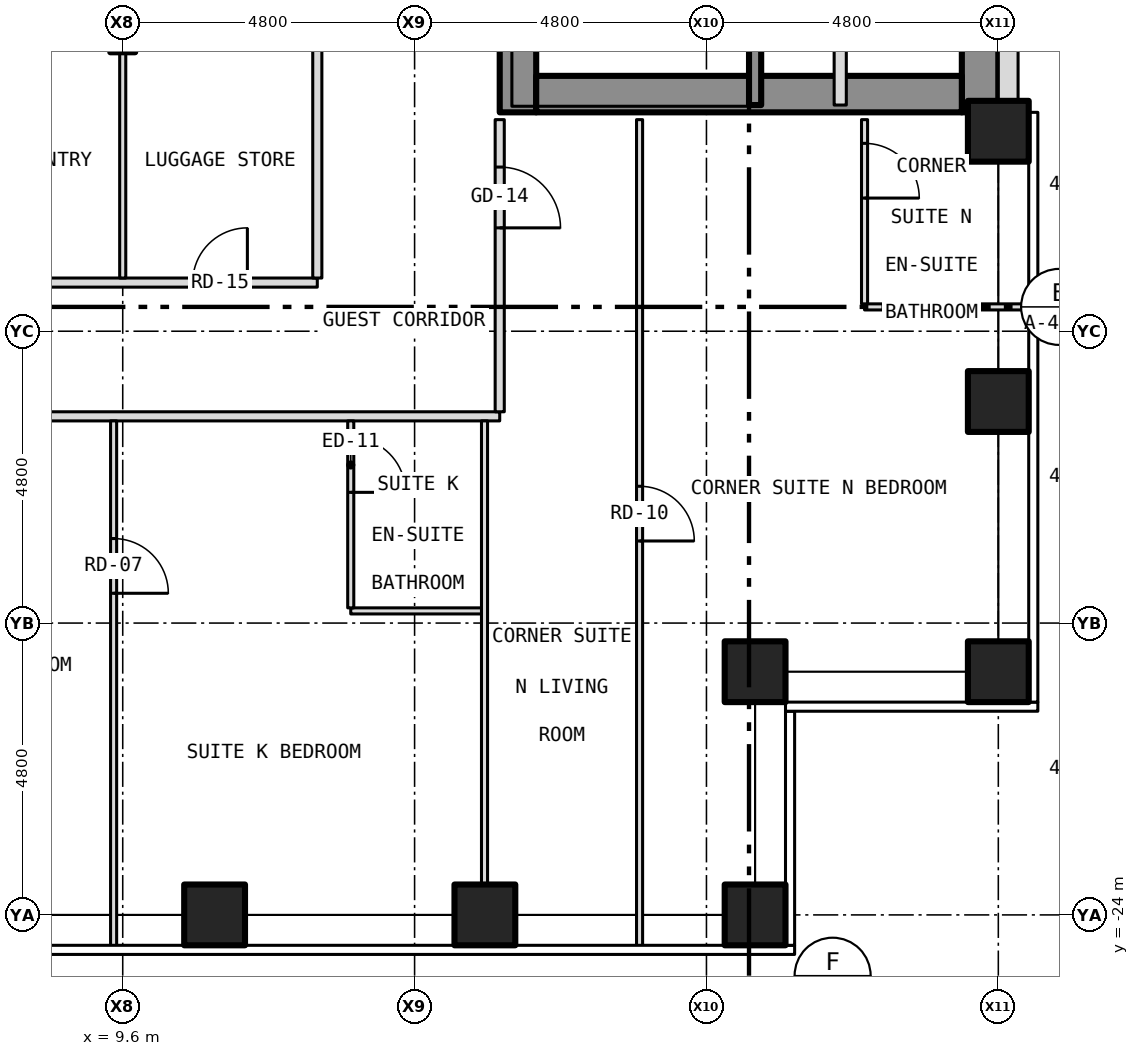
"""IFC4 building model, lengths in metres.
Left out: names, types, materials, properties, quantities, classifications, styles, units other than length and angle.
Written with IfcOpenShell. Run it as: python <this file> out.ifc"""

import sys

from ifc_helpers import new_model, si_unit, direction, frame, frame_2d, origin, origin_2d, place, context, subcontext, project, spatial, rectangle, hollow_rectangle, i_section, extrude, element, fill, save


model = new_model("IFC4")
c1 = context("Model", 3, precision=1e-05, world=origin(), true_north=direction((0.0, 1.0)))
c2 = subcontext(c1, "Body", "Model", "MODEL_VIEW")
j1 = project(units=[si_unit("LENGTHUNIT", "METRE"), si_unit("PLANEANGLEUNIT", "RADIAN")], contexts=[c1])
p1 = place(None, origin())
s1 = spatial("IfcSite", under=j1, at=p1, CompositionType="ELEMENT")
p2 = place(p1, origin())
s2 = spatial("IfcBuilding", under=s1, at=p2, CompositionType="ELEMENT")
p3 = place(p2, frame((0.0, 0.0, 53.0)))
s3 = spatial("IfcBuildingStorey", under=s2, at=p3, CompositionType="ELEMENT", Elevation=53.0)
for number, where, z_axis, x_axis in (
    (1, (11.111, -24.0, -0.15), (0.0, 0.0, 1.0), (1.0, 0.0, 0.0)),
    (2, (15.556, -24.0, -0.15), (0.0, 0.0, 1.0), (1.0, 0.0, 0.0)),
    (3, (20.0, -24.0, -0.15), (0.0, 0.0, 1.0), (1.0, 0.0, 0.0)),
    (4, (24.0, -20.0, -0.15), (0.0, 0.0, 1.0), (1.0, 0.0, 0.0)),
    (5, (24.0, -15.556, -0.15), (0.0, 0.0, 1.0), (1.0, 0.0, 0.0)),
    (6, (24.0, -11.111, -0.15), (0.0, 0.0, 1.0), (1.0, 0.0, 0.0)),
    (7, (20.0, -20.0, -0.15), (0.0, 0.0, 1.0), (1.0, 0.0, 0.0)),
):
    element("IfcColumn", number, at=place(p3, frame(where, z_axis=z_axis, x_axis=x_axis)), inside=s3, PredefinedType="COLUMN", context=c2, shape_type="SweptSolid", body=[
        extrude(hollow_rectangle(XDim=1.0, YDim=1.0, WallThickness=0.06, at=origin_2d()), origin(), (0.0, 0.0, 1.0), 3.5),
    ])
p4 = place(p3, frame((9.6, -9.6, -0.15), z_axis=(0.0, 0.0, 1.0), x_axis=(1.0, 0.0, 0.0)))
e8 = element("IfcColumn", 8, at=p4, inside=s3, PredefinedType="COLUMN", context=c2, shape_type="SweptSolid", body=[
    extrude(i_section(OverallWidth=0.409, OverallDepth=0.424, WebThickness=0.033, FlangeThickness=0.052, at=origin_2d()), origin(), (0.0, 0.0, 1.0), 3.5),
])
p5 = place(p3, frame((16.1, -10.8, 0.0), z_axis=(0.0, 0.0, 1.0), x_axis=(0.0, 1.0, 0.0)))
e9 = element("IfcWall", 9, at=p5, inside=s3, PredefinedType="SHEAR", context=c2, shape_type="SweptSolid", body=[
    extrude(rectangle(XDim=21.6, YDim=0.6, at=frame_2d((10.8, 0.0))), origin(), (0.0, 0.0, 1.0), 3.25),
])
p6 = place(p5, frame((9.4, 0.0, 0.0)))
e10 = element("IfcOpeningElement", 10, at=p6, cuts=e9, PredefinedType="OPENING", context=c2, shape_type="SweptSolid", body=[
    extrude(rectangle(XDim=1.1, YDim=2.1, at=frame_2d((0.55, 1.05))), frame((0.0, 0.312, 0.0), z_axis=(0.0, -1.0, 0.0), x_axis=(1.0, 0.0, 0.0)), (0.0, 0.0, 1.0), 0.624),
])
p7 = place(p5, frame((11.5, 0.0, 0.0)))
e11 = element("IfcOpeningElement", 11, at=p7, cuts=e9, PredefinedType="OPENING", context=c2, shape_type="SweptSolid", body=[
    extrude(rectangle(XDim=1.1, YDim=2.1, at=frame_2d((0.55, 1.05))), frame((0.0, 0.312, 0.0), z_axis=(0.0, -1.0, 0.0), x_axis=(1.0, 0.0, 0.0)), (0.0, 0.0, 1.0), 0.624),
])
p8 = place(p5, frame((13.6, 0.0, 0.0)))
e12 = element("IfcOpeningElement", 12, at=p8, cuts=e9, PredefinedType="OPENING", context=c2, shape_type="SweptSolid", body=[
    extrude(rectangle(XDim=1.1, YDim=2.1, at=frame_2d((0.55, 1.05))), frame((0.0, 0.312, 0.0), z_axis=(0.0, -1.0, 0.0), x_axis=(1.0, 0.0, 0.0)), (0.0, 0.0, 1.0), 0.624),
])
p9 = place(p5, frame((15.7, 0.0, 0.0)))
e13 = element("IfcOpeningElement", 13, at=p9, cuts=e9, PredefinedType="OPENING", context=c2, shape_type="SweptSolid", body=[
    extrude(rectangle(XDim=1.1, YDim=2.1, at=frame_2d((0.55, 1.05))), frame((0.0, 0.312, 0.0), z_axis=(0.0, -1.0, 0.0), x_axis=(1.0, 0.0, 0.0)), (0.0, 0.0, 1.0), 0.624),
])
p10 = place(p5, frame((17.8, 0.0, 0.0)))
e14 = element("IfcOpeningElement", 14, at=p10, cuts=e9, PredefinedType="OPENING", context=c2, shape_type="SweptSolid", body=[
    extrude(rectangle(XDim=1.1, YDim=2.1, at=frame_2d((0.55, 1.05))), frame((0.0, 0.312, 0.0), z_axis=(0.0, -1.0, 0.0), x_axis=(1.0, 0.0, 0.0)), (0.0, 0.0, 1.0), 0.624),
])
p11 = place(p5, frame((5.642, 0.0, 0.0)))
e15 = element("IfcOpeningElement", 15, at=p11, cuts=e9, PredefinedType="OPENING", context=c2, shape_type="SweptSolid", body=[
    extrude(rectangle(XDim=1.1, YDim=2.1, at=frame_2d((0.55, 1.05))), frame((0.0, 0.312, 0.0), z_axis=(0.0, -1.0, 0.0), x_axis=(1.0, 0.0, 0.0)), (0.0, 0.0, 1.0), 0.624),
])
p12 = place(p5, frame((7.5, 0.0, 0.0)))
e16 = element("IfcOpeningElement", 16, at=p12, cuts=e9, PredefinedType="OPENING", context=c2, shape_type="SweptSolid", body=[
    extrude(rectangle(XDim=1.1, YDim=2.1, at=frame_2d((0.55, 1.05))), frame((0.0, 0.312, 0.0), z_axis=(0.0, -1.0, 0.0), x_axis=(1.0, 0.0, 0.0)), (0.0, 0.0, 1.0), 0.624),
])
p13 = place(p3, frame((23.7, -10.8, 0.0), z_axis=(0.0, 0.0, 1.0), x_axis=(0.0, 1.0, 0.0)))
e17 = element("IfcWall", 17, at=p13, inside=s3, PredefinedType="SHEAR", context=c2, shape_type="SweptSolid", body=[
    extrude(rectangle(XDim=21.6, YDim=0.6, at=frame_2d((10.8, 0.0))), origin(), (0.0, 0.0, 1.0), 3.25),
])
p14 = place(p3, frame((16.4, -10.5, 0.0), z_axis=(0.0, 0.0, 1.0), x_axis=(1.0, 0.0, 0.0)))
e18 = element("IfcWall", 18, at=p14, inside=s3, PredefinedType="SHEAR", context=c2, shape_type="SweptSolid", body=[
    extrude(rectangle(XDim=7.0, YDim=0.6, at=frame_2d((3.5, 0.0))), origin(), (0.0, 0.0, 1.0), 3.25),
])
p15 = place(p3, frame((24.163, -10.8, 0.0), z_axis=(0.0, 0.0, 1.0), x_axis=(0.0, 1.0, 0.0)))
e19 = element("IfcWall", 19, at=p15, inside=s3, PredefinedType="SOLIDWALL", context=c2, shape_type="SweptSolid", body=[
    extrude(rectangle(XDim=21.6, YDim=0.325, at=frame_2d((10.8, 0.0))), origin(), (0.0, 0.0, 1.0), 3.5),
])
p16 = place(p15, frame((2.95, 0.0, 1.0)))
e20 = element("IfcOpeningElement", 20, at=p16, cuts=e19, PredefinedType="OPENING", context=c2, shape_type="SweptSolid", body=[
    extrude(rectangle(XDim=0.6, YDim=1.5, at=frame_2d((0.3, 0.75))), frame((0.0, 0.175, 0.0), z_axis=(0.0, -1.0, 0.0), x_axis=(1.0, 0.0, 0.0)), (0.0, 0.0, 1.0), 0.349),
])
p17 = place(p3, frame((13.35, -19.0, 0.0), z_axis=(0.0, 0.0, 1.0), x_axis=(1.0, 0.0, 0.0)))
e21 = element("IfcWall", 21, at=p17, inside=s3, PredefinedType="PARTITIONING", context=c2, shape_type="SweptSolid", body=[
    extrude(rectangle(XDim=2.2, YDim=0.1, at=frame_2d((1.1, 0.0))), origin(), (0.0, 0.0, 1.0), 3.35),
])
p18 = place(p3, frame((-15.8, -15.8, 0.0), z_axis=(0.0, 0.0, 1.0), x_axis=(1.0, 0.0, 0.0)))
e22 = element("IfcWall", 22, at=p18, inside=s3, PredefinedType="PARTITIONING", context=c2, shape_type="SweptSolid", body=[
    extrude(rectangle(XDim=31.6, YDim=0.15, at=frame_2d((15.8, 0.0))), origin(), (0.0, 0.0, 1.0), 3.35),
])
p19 = place(p18, frame((3.067, 0.0, 0.0)))
e23 = element("IfcOpeningElement", 23, at=p19, cuts=e22, PredefinedType="OPENING", context=c2, shape_type="SweptSolid", body=[
    extrude(rectangle(XDim=1.0, YDim=2.1, at=frame_2d((0.5, 1.05))), frame((0.0, 0.087, 0.0), z_axis=(0.0, -1.0, 0.0), x_axis=(1.0, 0.0, 0.0)), (0.0, 0.0, 1.0), 0.174),
])
p20 = place(p18, frame((5.311, 0.0, 0.0)))
e24 = element("IfcOpeningElement", 24, at=p20, cuts=e22, PredefinedType="OPENING", context=c2, shape_type="SweptSolid", body=[
    extrude(rectangle(XDim=1.0, YDim=2.1, at=frame_2d((0.5, 1.05))), frame((0.0, 0.087, 0.0), z_axis=(0.0, -1.0, 0.0), x_axis=(1.0, 0.0, 0.0)), (0.0, 0.0, 1.0), 0.174),
])
p21 = place(p18, frame((9.756, 0.0, 0.0)))
e25 = element("IfcOpeningElement", 25, at=p21, cuts=e22, PredefinedType="OPENING", context=c2, shape_type="SweptSolid", body=[
    extrude(rectangle(XDim=1.0, YDim=2.1, at=frame_2d((0.5, 1.05))), frame((0.0, 0.087, 0.0), z_axis=(0.0, -1.0, 0.0), x_axis=(1.0, 0.0, 0.0)), (0.0, 0.0, 1.0), 0.174),
])
p22 = place(p18, frame((15.311, 0.0, 0.0)))
e26 = element("IfcOpeningElement", 26, at=p22, cuts=e22, PredefinedType="OPENING", context=c2, shape_type="SweptSolid", body=[
    extrude(rectangle(XDim=1.0, YDim=2.1, at=frame_2d((0.5, 1.05))), frame((0.0, 0.087, 0.0), z_axis=(0.0, -1.0, 0.0), x_axis=(1.0, 0.0, 0.0)), (0.0, 0.0, 1.0), 0.174),
])
p23 = place(p18, frame((22.245, 0.0, 0.0)))
e27 = element("IfcOpeningElement", 27, at=p23, cuts=e22, PredefinedType="OPENING", context=c2, shape_type="SweptSolid", body=[
    extrude(rectangle(XDim=1.0, YDim=2.1, at=frame_2d((0.5, 1.05))), frame((0.0, 0.087, 0.0), z_axis=(0.0, -1.0, 0.0), x_axis=(1.0, 0.0, 0.0)), (0.0, 0.0, 1.0), 0.174),
])
p24 = place(p3, frame((21.8, -14.0, 0.0), z_axis=(0.0, 0.0, 1.0), x_axis=(1.0, 0.0, 0.0)))
e28 = element("IfcWall", 28, at=p24, inside=s3, PredefinedType="PARTITIONING", context=c2, shape_type="SweptSolid", body=[
    extrude(rectangle(XDim=2.73, YDim=0.1, at=frame_2d((1.365, 0.0))), origin(), (0.0, 0.0, 1.0), 3.35),
])
p25 = place(p3, frame((6.3, -13.6, 0.0), z_axis=(0.0, 0.0, 1.0), x_axis=(1.0, 0.0, 0.0)))
e29 = element("IfcWall", 29, at=p25, inside=s3, PredefinedType="PARTITIONING", context=c2, shape_type="SweptSolid", body=[
    extrude(rectangle(XDim=6.5, YDim=0.15, at=frame_2d((3.25, 0.0))), origin(), (0.0, 0.0, 1.0), 3.35),
])
p26 = place(p25, frame((4.45, 0.0, 0.0)))
e30 = element("IfcOpeningElement", 30, at=p26, cuts=e29, PredefinedType="OPENING", context=c2, shape_type="SweptSolid", body=[
    extrude(rectangle(XDim=0.9, YDim=2.1, at=frame_2d((0.45, 1.05))), frame((0.0, 0.087, 0.0), z_axis=(0.0, -1.0, 0.0), x_axis=(1.0, 0.0, 0.0)), (0.0, 0.0, 1.0), 0.174),
])
p27 = place(p3, frame((9.45, -24.53, 0.0), z_axis=(0.0, 0.0, 1.0), x_axis=(0.0, 1.0, 0.0)))
e31 = element("IfcWall", 31, at=p27, inside=s3, PredefinedType="PARTITIONING", context=c2, shape_type="SweptSolid", body=[
    extrude(rectangle(XDim=8.655, YDim=0.1, at=frame_2d((4.328, 0.0))), origin(), (0.0, 0.0, 1.0), 2.728),
])
p28 = place(p27, frame((5.82, 0.0, 0.0)))
e32 = element("IfcOpeningElement", 32, at=p28, cuts=e31, PredefinedType="OPENING", context=c2, shape_type="SweptSolid", body=[
    extrude(rectangle(XDim=0.9, YDim=2.1, at=frame_2d((0.45, 1.05))), frame((0.0, 0.062, 0.0), z_axis=(0.0, -1.0, 0.0), x_axis=(1.0, 0.0, 0.0)), (0.0, 0.0, 1.0), 0.124),
])
p29 = place(p3, frame((9.6, -13.525, 0.0), z_axis=(0.0, 0.0, 1.0), x_axis=(0.0, 1.0, 0.0)))
e33 = element("IfcWall", 33, at=p29, inside=s3, PredefinedType="PARTITIONING", context=c2, shape_type="SweptSolid", body=[
    extrude(rectangle(XDim=3.875, YDim=0.1, at=frame_2d((1.938, 0.0))), origin(), (0.0, 0.0, 1.0), 2.728),
])
p30 = place(p3, frame((12.8, -13.525, 0.0), z_axis=(0.0, 0.0, 1.0), x_axis=(0.0, 1.0, 0.0)))
e34 = element("IfcWall", 34, at=p30, inside=s3, PredefinedType="PARTITIONING", context=c2, shape_type="SweptSolid", body=[
    extrude(rectangle(XDim=11.525, YDim=0.15, at=frame_2d((5.762, 0.0))), origin(), (0.0, 0.0, 1.0), 3.35),
])
p31 = place(p30, frame((7.325, 0.0, 0.0)))
e35 = element("IfcOpeningElement", 35, at=p31, cuts=e34, PredefinedType="OPENING", context=c2, shape_type="SweptSolid", body=[
    extrude(rectangle(XDim=0.9, YDim=2.1, at=frame_2d((0.45, 1.05))), frame((0.0, 0.087, 0.0), z_axis=(0.0, -1.0, 0.0), x_axis=(1.0, 0.0, 0.0)), (0.0, 0.0, 1.0), 0.174),
])
p32 = place(p3, frame((13.35, -18.95, 0.0), z_axis=(0.0, 0.0, 1.0), x_axis=(0.0, 1.0, 0.0)))
e36 = element("IfcWall", 36, at=p32, inside=s3, PredefinedType="PARTITIONING", context=c2, shape_type="SweptSolid", body=[
    extrude(rectangle(XDim=3.075, YDim=0.1, at=frame_2d((1.538, 0.0))), origin(), (0.0, 0.0, 1.0), 3.35),
])
p33 = place(p32, frame((1.9, 0.0, 0.0)))
e37 = element("IfcOpeningElement", 37, at=p33, cuts=e36, PredefinedType="OPENING", context=c2, shape_type="SweptSolid", body=[
    extrude(rectangle(XDim=0.9, YDim=2.1, at=frame_2d((0.45, 1.05))), frame((0.0, 0.062, 0.0), z_axis=(0.0, -1.0, 0.0), x_axis=(1.0, 0.0, 0.0)), (0.0, 0.0, 1.0), 0.124),
])
p34 = place(p3, frame((15.55, -23.88, 0.0), z_axis=(0.0, 0.0, 1.0), x_axis=(0.0, 1.0, 0.0)))
e38 = element("IfcWall", 38, at=p34, inside=s3, PredefinedType="PARTITIONING", context=c2, shape_type="SweptSolid", body=[
    extrude(rectangle(XDim=8.005, YDim=0.1, at=frame_2d((4.002, 0.0))), origin(), (0.0, 0.0, 1.0), 3.35),
])
p35 = place(p3, frame((15.8, -15.725, 0.0), z_axis=(0.0, 0.0, 1.0), x_axis=(0.0, 1.0, 0.0)))
e39 = element("IfcWall", 39, at=p35, inside=s3, PredefinedType="PARTITIONING", context=c2, shape_type="SweptSolid", body=[
    extrude(rectangle(XDim=4.805, YDim=0.15, at=frame_2d((2.403, 0.0))), origin(), (0.0, 0.0, 1.0), 3.35),
])
p36 = place(p35, frame((3.025, 0.0, 0.0)))
e40 = element("IfcOpeningElement", 40, at=p36, cuts=e39, PredefinedType="OPENING", context=c2, shape_type="SweptSolid", body=[
    extrude(rectangle(XDim=1.0, YDim=2.1, at=frame_2d((0.5, 1.05))), frame((0.0, 0.087, 0.0), z_axis=(0.0, -1.0, 0.0), x_axis=(1.0, 0.0, 0.0)), (0.0, 0.0, 1.0), 0.174),
])
p37 = place(p3, frame((18.1, -24.53, 0.0), z_axis=(0.0, 0.0, 1.0), x_axis=(0.0, 1.0, 0.0)))
e41 = element("IfcWall", 41, at=p37, inside=s3, PredefinedType="PARTITIONING", context=c2, shape_type="SweptSolid", body=[
    extrude(rectangle(XDim=13.61, YDim=0.1, at=frame_2d((6.805, 0.0))), origin(), (0.0, 0.0, 1.0), 3.35),
])
p38 = place(p37, frame((6.68, 0.0, 0.0)))
e42 = element("IfcOpeningElement", 42, at=p38, cuts=e41, PredefinedType="OPENING", context=c2, shape_type="SweptSolid", body=[
    extrude(rectangle(XDim=0.9, YDim=2.1, at=frame_2d((0.45, 1.05))), frame((0.0, 0.062, 0.0), z_axis=(0.0, -1.0, 0.0), x_axis=(1.0, 0.0, 0.0)), (0.0, 0.0, 1.0), 0.124),
])
p39 = place(p3, frame((20.0, -10.68, 0.0), z_axis=(0.0, 0.0, 1.0), x_axis=(0.0, 1.0, 0.0)))
e43 = element("IfcWall", 43, at=p39, inside=s3, PredefinedType="SHEAR", context=c2, shape_type="SweptSolid", body=[
    extrude(rectangle(XDim=6.98, YDim=0.2, at=frame_2d((3.49, 0.0))), origin(), (0.0, 0.0, 1.0), 3.25),
])
p40 = place(p3, frame((21.4, -10.68, 0.0), z_axis=(0.0, 0.0, 1.0), x_axis=(0.0, 1.0, 0.0)))
e44 = element("IfcWall", 44, at=p40, inside=s3, PredefinedType="PARTITIONING", context=c2, shape_type="SweptSolid", body=[
    extrude(rectangle(XDim=8.68, YDim=0.2, at=frame_2d((4.34, 0.0))), origin(), (0.0, 0.0, 1.0), 3.25),
])
p41 = place(p40, frame((3.88, 0.0, 0.0)))
e45 = element("IfcOpeningElement", 45, at=p41, cuts=e44, PredefinedType="OPENING", context=c2, shape_type="SweptSolid", body=[
    extrude(rectangle(XDim=0.9, YDim=2.1, at=frame_2d((0.45, 1.05))), frame((0.0, 0.112, 0.0), z_axis=(0.0, -1.0, 0.0), x_axis=(1.0, 0.0, 0.0)), (0.0, 0.0, 1.0), 0.224),
])
p42 = place(p3, frame((21.8, -13.95, 0.0), z_axis=(0.0, 0.0, 1.0), x_axis=(0.0, 1.0, 0.0)))
e46 = element("IfcWall", 46, at=p42, inside=s3, PredefinedType="PARTITIONING", context=c2, shape_type="SweptSolid", body=[
    extrude(rectangle(XDim=3.03, YDim=0.1, at=frame_2d((1.515, 0.0))), origin(), (0.0, 0.0, 1.0), 3.35),
])
p43 = place(p42, frame((1.74, 0.0, 0.0)))
e47 = element("IfcOpeningElement", 47, at=p43, cuts=e46, PredefinedType="OPENING", context=c2, shape_type="SweptSolid", body=[
    extrude(rectangle(XDim=0.9, YDim=2.1, at=frame_2d((0.45, 1.05))), frame((0.0, 0.062, 0.0), z_axis=(0.0, -1.0, 0.0), x_axis=(1.0, 0.0, 0.0)), (0.0, 0.0, 1.0), 0.124),
])
p44 = place(p28, origin())
e48 = element("IfcDoor", 48, at=p44, inside=s3, OperationType="SINGLE_SWING_LEFT", PredefinedType="DOOR", context=c2, shape_type="SweptSolid", body=[
    extrude(rectangle(XDim=0.9, YDim=2.1, at=frame_2d((0.45, 1.05))), frame((0.0, 0.025, 0.0), z_axis=(0.0, -1.0, 0.0), x_axis=(1.0, 0.0, 0.0)), (0.0, 0.0, 1.0), 0.05),
])
fill(e32, e48)
p45 = place(p33, origin())
e49 = element("IfcDoor", 49, at=p45, inside=s3, OperationType="SINGLE_SWING_LEFT", PredefinedType="DOOR", context=c2, shape_type="SweptSolid", body=[
    extrude(rectangle(XDim=0.9, YDim=2.1, at=frame_2d((0.45, 1.05))), frame((0.0, 0.025, 0.0), z_axis=(0.0, -1.0, 0.0), x_axis=(1.0, 0.0, 0.0)), (0.0, 0.0, 1.0), 0.05),
])
fill(e37, e49)
p46 = place(p36, origin())
e50 = element("IfcDoor", 50, at=p46, inside=s3, OperationType="SINGLE_SWING_LEFT", PredefinedType="DOOR", context=c2, shape_type="SweptSolid", body=[
    extrude(rectangle(XDim=1.0, YDim=2.1, at=frame_2d((0.5, 1.05))), frame((0.0, 0.025, 0.0), z_axis=(0.0, -1.0, 0.0), x_axis=(1.0, 0.0, 0.0)), (0.0, 0.0, 1.0), 0.05),
])
fill(e40, e50)
p47 = place(p38, origin())
e51 = element("IfcDoor", 51, at=p47, inside=s3, OperationType="SINGLE_SWING_LEFT", PredefinedType="DOOR", context=c2, shape_type="SweptSolid", body=[
    extrude(rectangle(XDim=0.9, YDim=2.1, at=frame_2d((0.45, 1.05))), frame((0.0, 0.025, 0.0), z_axis=(0.0, -1.0, 0.0), x_axis=(1.0, 0.0, 0.0)), (0.0, 0.0, 1.0), 0.05),
])
fill(e42, e51)
p48 = place(p43, origin())
e52 = element("IfcDoor", 52, at=p48, inside=s3, OperationType="SINGLE_SWING_LEFT", PredefinedType="DOOR", context=c2, shape_type="SweptSolid", body=[
    extrude(rectangle(XDim=0.9, YDim=2.1, at=frame_2d((0.45, 1.05))), frame((0.0, 0.025, 0.0), z_axis=(0.0, -1.0, 0.0), x_axis=(1.0, 0.0, 0.0)), (0.0, 0.0, 1.0), 0.05),
])
fill(e47, e52)
p49 = place(p26, origin())
e53 = element("IfcDoor", 53, at=p49, inside=s3, OperationType="SINGLE_SWING_RIGHT", PredefinedType="DOOR", context=c2, shape_type="SweptSolid", body=[
    extrude(rectangle(XDim=0.9, YDim=2.1, at=frame_2d((0.45, 1.05))), frame((0.0, 0.025, 0.0), z_axis=(0.0, -1.0, 0.0), x_axis=(1.0, 0.0, 0.0)), (0.0, 0.0, 1.0), 0.05),
])
fill(e30, e53)
save(model, sys.argv[1])
